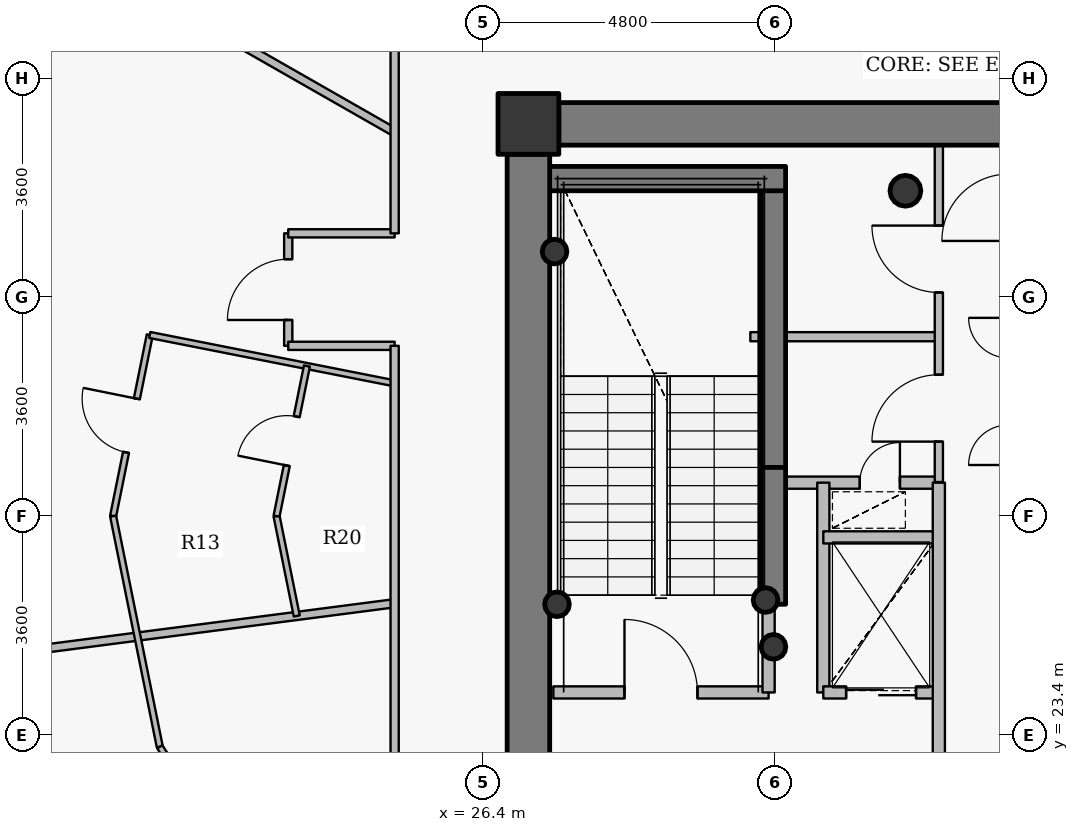
"""IFC4 building model, lengths in metres.
Left out: names, types, materials, properties, quantities, classifications, styles, units other than length and angle.
Written with IfcOpenShell. Run it as: python <this file> out.ifc"""

import sys

from ifc_helpers import new_model, si_unit, direction, frame, frame_2d, origin, origin_2d, place, context, subcontext, project, spatial, rectangle, hollow_circle, extrude, source, transform, mapped, element, fill, save


model = new_model("IFC4")
c1 = context("Model", 3, precision=1e-05, world=origin(), true_north=direction((0.0, 1.0)))
c2 = subcontext(c1, "Body", "Model", "MODEL_VIEW")
j1 = project(units=[si_unit("LENGTHUNIT", "METRE"), si_unit("PLANEANGLEUNIT", "RADIAN")], contexts=[c1])
p1 = place(None, origin())
s1 = spatial("IfcSite", under=j1, at=p1, CompositionType="ELEMENT")
p2 = place(p1, origin())
s2 = spatial("IfcBuilding", under=s1, at=p2, CompositionType="ELEMENT")
p3 = place(p2, frame((0.0, 0.0, 303.0)))
s3 = spatial("IfcBuildingStorey", under=s2, at=p3, CompositionType="ELEMENT", Elevation=303.0)
p4 = place(p3, frame((27.15, 33.45, 0.0), z_axis=(0.0, 0.0, 1.0), x_axis=(1.0, 0.0, 0.0)))
e1 = element("IfcColumn", 1, at=p4, inside=s3, PredefinedType="COLUMN", context=c2, shape_type="SweptSolid", body=[
    extrude(rectangle(XDim=1.0, YDim=1.0, at=origin_2d()), origin(), (0.0, 0.0, 1.0), 3.75),
])
p5 = place(p3, frame((33.35, 32.35, 0.0), z_axis=(0.0, 0.0, 1.0), x_axis=(1.0, 0.0, 0.0)))
e2 = element("IfcColumn", 2, at=p5, inside=s3, PredefinedType="COLUMN", context=c2, shape_type="SweptSolid", body=[
    extrude(hollow_circle(Radius=0.254, WallThickness=0.02, at=origin_2d()), origin(), (0.0, 0.0, 1.0), 3.75),
])
p6 = place(p3, frame((31.18, 27.8, 0.0), z_axis=(0.0, 0.0, 1.0), x_axis=(0.0, 1.0, 0.0)))
e3 = element("IfcWall", 3, at=p6, inside=s3, PredefinedType="SHEAR", context=c2, shape_type="SweptSolid", body=[
    extrude(rectangle(XDim=4.75, YDim=0.4, at=frame_2d((2.375, 0.0))), origin(), (0.0, 0.0, 1.0), 3.75),
])
p7 = place(p3, frame((27.25, 32.55, 0.0), z_axis=(0.0, 0.0, 1.0), x_axis=(1.0, 0.0, 0.0)))
e4 = element("IfcWall", 4, at=p7, inside=s3, PredefinedType="SHEAR", context=c2, shape_type="SweptSolid", body=[
    extrude(rectangle(XDim=4.13, YDim=0.4, at=frame_2d((2.065, 0.0))), origin(), (0.0, 0.0, 1.0), 3.75),
])
for number, where, z_axis, x_axis in (
    (5, (27.58, 31.35, 0.0), (0.0, 0.0, 1.0), (1.0, 0.0, 0.0)),
    (6, (31.05, 25.62, 0.0), (0.0, 0.0, 1.0), (1.0, 0.0, 0.0)),
    (7, (31.18, 24.85, 0.0), (0.0, 0.0, 1.0), (1.0, 0.0, 0.0)),
    (8, (27.62, 25.55, 0.0), (0.0, 0.0, 1.0), (1.0, 0.0, 0.0)),
):
    element("IfcColumn", number, at=place(p3, frame(where, z_axis=z_axis, x_axis=x_axis)), inside=s3, PredefinedType="COLUMN", context=c2, shape_type="SweptSolid", body=[
        extrude(hollow_circle(Radius=0.203, WallThickness=0.016, at=origin_2d()), origin(), (0.0, 0.0, 1.0), 3.75),
    ])
p8 = place(p3, frame((27.65, 33.45, 0.0), z_axis=(0.0, 0.0, 1.0), x_axis=(1.0, 0.0, 0.0)))
e9 = element("IfcWall", 9, at=p8, inside=s3, PredefinedType="SHEAR", context=c2, shape_type="SweptSolid", body=[
    extrude(rectangle(XDim=16.7, YDim=0.7, at=frame_2d((8.35, 0.0))), origin(), (0.0, 0.0, 1.0), 3.05),
])
p9 = place(p8, frame((12.775, 0.0, 0.0)))
e10 = element("IfcOpeningElement", 10, at=p9, cuts=e9, PredefinedType="OPENING", context=c2, shape_type="SweptSolid", body=[
    extrude(rectangle(XDim=1.15, YDim=2.15, at=origin_2d()), frame((0.575, 0.36, 1.075), z_axis=(0.0, -1.0, 0.0), x_axis=(1.0, 0.0, 0.0)), (0.0, 0.0, 1.0), 0.72),
])
p10 = place(p3, frame((27.15, 21.05, 0.0), z_axis=(0.0, 0.0, 1.0), x_axis=(0.0, 1.0, 0.0)))
e11 = element("IfcWall", 11, at=p10, inside=s3, PredefinedType="SHEAR", context=c2, shape_type="SweptSolid", body=[
    extrude(rectangle(XDim=11.9, YDim=0.7, at=frame_2d((5.95, 0.0))), origin(), (0.0, 0.0, 1.0), 3.05),
])
p11 = place(p3, frame((31.18, 25.55, 0.0), z_axis=(0.0, 0.0, 1.0), x_axis=(0.0, 1.0, 0.0)))
e12 = element("IfcWall", 12, at=p11, inside=s3, PredefinedType="SHEAR", context=c2, shape_type="SweptSolid", body=[
    extrude(rectangle(XDim=2.25, YDim=0.4, at=frame_2d((1.125, 0.0))), origin(), (0.0, 0.0, 1.0), 3.1),
])
p12 = place(p3, frame((14.033, 24.151, 0.0), z_axis=(0.0, 0.0, 1.0), x_axis=(0.99169266035, 0.128629963101, 0.0)))
e13 = element("IfcWall", 13, at=p12, inside=s3, PredefinedType="PARTITIONING", context=c2, shape_type="SweptSolid", body=[
    extrude(rectangle(XDim=11.009, YDim=0.135, at=frame_2d((5.504, 0.0))), origin(), (0.0, 0.0, 1.0), 2.985),
])
p13 = place(p3, frame((18.016, 37.274, 0.0), z_axis=(0.0, 0.0, 1.0), x_axis=(0.868277005727, -0.496079672357, 0.0)))
e14 = element("IfcWall", 14, at=p13, inside=s3, PredefinedType="PARTITIONING", context=c2, shape_type="SweptSolid", body=[
    extrude(rectangle(XDim=7.985, YDim=0.135, at=frame_2d((3.993, 0.0))), origin(), (0.0, 0.0, 1.0), 2.985),
])
p14 = place(p3, frame((20.32, 27.0, 0.0), z_axis=(0.0, 0.0, 1.0), x_axis=(0.198201469781, 0.980161301713, 0.0)))
e15 = element("IfcWall", 15, at=p14, inside=s3, PredefinedType="PARTITIONING", context=c2, shape_type="SweptSolid", body=[
    extrude(rectangle(XDim=3.039, YDim=0.1, at=frame_2d((1.52, 0.0))), origin(), (0.0, 0.0, 1.0), 3.035),
])
p15 = place(p14, frame((1.069, 0.0, 0.0)))
e16 = element("IfcOpeningElement", 16, at=p15, cuts=e15, PredefinedType="OPENING", context=c2, shape_type="SweptSolid", body=[
    extrude(rectangle(XDim=0.9, YDim=2.1, at=origin_2d()), frame((0.45, 0.06, 1.05), z_axis=(0.0, -1.0, 0.0), x_axis=(1.0, 0.0, 0.0)), (0.0, 0.0, 1.0), 0.12),
])
p16 = place(p3, frame((20.32, 27.0, 0.0), z_axis=(0.0, 0.0, 1.0), x_axis=(0.198226068862, -0.980156327135, 0.0)))
e17 = element("IfcWall", 17, at=p16, inside=s3, PredefinedType="PARTITIONING", context=c2, shape_type="SweptSolid", body=[
    extrude(rectangle(XDim=3.871, YDim=0.1, at=frame_2d((1.936, 0.0))), origin(), (0.0, 0.0, 1.0), 3.035),
])
p17 = place(p3, frame((20.922, 29.979, 0.0), z_axis=(0.0, 0.0, 1.0), x_axis=(0.981042206934, -0.19379419035, 0.0)))
e18 = element("IfcWall", 18, at=p17, inside=s3, PredefinedType="PARTITIONING", context=c2, shape_type="SweptSolid", body=[
    extrude(rectangle(XDim=4.106, YDim=0.1, at=frame_2d((2.053, 0.0))), origin(), (0.0, 0.0, 1.0), 3.5),
])
p18 = place(p3, frame((21.087, 23.206, 0.0), z_axis=(0.0, 0.0, 1.0), x_axis=(0.545435886628, -0.838152547916, 0.0)))
e19 = element("IfcWall", 19, at=p18, inside=s3, PredefinedType="PARTITIONING", context=c2, shape_type="SweptSolid", body=[
    extrude(rectangle(XDim=4.083, YDim=0.1, at=frame_2d((2.042, 0.0))), origin(), (0.0, 0.0, 1.0), 3.035),
])
p19 = place(p3, frame((23.008, 27.0, 0.0), z_axis=(0.0, 0.0, 1.0), x_axis=(0.198189512146, -0.980163719628, 0.0)))
e20 = element("IfcWall", 20, at=p19, inside=s3, PredefinedType="PARTITIONING", context=c2, shape_type="SweptSolid", body=[
    extrude(rectangle(XDim=1.675, YDim=0.1, at=frame_2d((0.838, 0.0))), origin(), (0.0, 0.0, 1.0), 3.035),
])
p20 = place(p3, frame((23.008, 27.0, 0.0), z_axis=(0.0, 0.0, 1.0), x_axis=(0.19818541272, 0.980164548525, 0.0)))
e21 = element("IfcWall", 21, at=p20, inside=s3, PredefinedType="PARTITIONING", context=c2, shape_type="SweptSolid", body=[
    extrude(rectangle(XDim=2.518, YDim=0.1, at=frame_2d((1.259, 0.0))), origin(), (0.0, 0.0, 1.0), 3.035),
])
p21 = place(p20, frame((0.849, 0.0, 0.0)))
e22 = element("IfcOpeningElement", 22, at=p21, cuts=e21, PredefinedType="OPENING", context=c2, shape_type="SweptSolid", body=[
    extrude(rectangle(XDim=0.82, YDim=2.1, at=origin_2d()), frame((0.41, 0.06, 1.05), z_axis=(0.0, -1.0, 0.0), x_axis=(1.0, 0.0, 0.0)), (0.0, 0.0, 1.0), 0.12),
])
p22 = place(p3, frame((23.2, 29.8, 0.0), z_axis=(0.0, 0.0, 1.0), x_axis=(0.0, 1.0, 0.0)))
e23 = element("IfcWall", 23, at=p22, inside=s3, PredefinedType="PARTITIONING", context=c2, shape_type="SweptSolid", body=[
    extrude(rectangle(XDim=1.85, YDim=0.135, at=frame_2d((0.925, 0.0))), origin(), (0.0, 0.0, 1.0), 3.5),
])
p23 = place(p22, frame((0.425, 0.0, 0.0)))
e24 = element("IfcOpeningElement", 24, at=p23, cuts=e23, PredefinedType="OPENING", context=c2, shape_type="SweptSolid", body=[
    extrude(rectangle(XDim=1.0, YDim=2.15, at=origin_2d()), frame((0.5, 0.078, 1.075), z_axis=(0.0, -1.0, 0.0), x_axis=(1.0, 0.0, 0.0)), (0.0, 0.0, 1.0), 0.155),
])
p24 = place(p3, frame((23.2, 29.8, 0.0), z_axis=(0.0, 0.0, 1.0), x_axis=(1.0, 0.0, 0.0)))
e25 = element("IfcWall", 25, at=p24, inside=s3, PredefinedType="PARTITIONING", context=c2, shape_type="SweptSolid", body=[
    extrude(rectangle(XDim=1.75, YDim=0.135, at=frame_2d((0.875, 0.0))), origin(), (0.0, 0.0, 1.0), 3.5),
])
p25 = place(p3, frame((23.2, 31.65, 0.0), z_axis=(0.0, 0.0, 1.0), x_axis=(1.0, 0.0, 0.0)))
e26 = element("IfcWall", 26, at=p25, inside=s3, PredefinedType="PARTITIONING", context=c2, shape_type="SweptSolid", body=[
    extrude(rectangle(XDim=1.75, YDim=0.135, at=frame_2d((0.875, 0.0))), origin(), (0.0, 0.0, 1.0), 3.035),
])
p26 = place(p3, frame((24.95, 18.35, 0.0), z_axis=(0.0, 0.0, 1.0), x_axis=(0.0, 1.0, 0.0)))
e27 = element("IfcWall", 27, at=p26, inside=s3, PredefinedType="PARTITIONING", context=c2, shape_type="SweptSolid", body=[
    extrude(rectangle(XDim=11.45, YDim=0.135, at=frame_2d((5.725, 0.0))), origin(), (0.0, 0.0, 1.0), 3.035),
])
p27 = place(p26, frame((3.128, 0.0, 0.0)))
e28 = element("IfcOpeningElement", 28, at=p27, cuts=e27, PredefinedType="OPENING", context=c2, shape_type="SweptSolid", body=[
    extrude(rectangle(XDim=1.0, YDim=2.15, at=origin_2d()), frame((0.5, 0.078, 1.075), z_axis=(0.0, -1.0, 0.0), x_axis=(1.0, 0.0, 0.0)), (0.0, 0.0, 1.0), 0.155),
])
p28 = place(p3, frame((24.95, 31.65, 0.0), z_axis=(0.0, 0.0, 1.0), x_axis=(0.0, 1.0, 0.0)))
e29 = element("IfcWall", 29, at=p28, inside=s3, PredefinedType="PARTITIONING", context=c2, shape_type="SweptSolid", body=[
    extrude(rectangle(XDim=4.0, YDim=0.135, at=frame_2d((2.0, 0.0))), origin(), (0.0, 0.0, 1.0), 3.035),
])
p29 = place(p3, frame((27.56, 24.1, 0.0), z_axis=(0.0, 0.0, 1.0), x_axis=(1.0, 0.0, 0.0)))
e30 = element("IfcWall", 30, at=p29, inside=s3, PredefinedType="PARTITIONING", context=c2, shape_type="SweptSolid", body=[
    extrude(rectangle(XDim=3.54, YDim=0.2, at=frame_2d((1.77, 0.0))), origin(), (0.0, 0.0, 1.0), 3.5),
])
p30 = place(p29, frame((1.17, 0.0, 0.0)))
e31 = element("IfcOpeningElement", 31, at=p30, cuts=e30, PredefinedType="OPENING", context=c2, shape_type="SweptSolid", body=[
    extrude(rectangle(XDim=1.2, YDim=2.15, at=origin_2d()), frame((0.6, 0.11, 1.075), z_axis=(0.0, -1.0, 0.0), x_axis=(1.0, 0.0, 0.0)), (0.0, 0.0, 1.0), 0.22),
])
p31 = place(p3, frame((30.8, 29.95, 0.0), z_axis=(0.0, 0.0, 1.0), x_axis=(1.0, 0.0, 0.0)))
e32 = element("IfcWall", 32, at=p31, inside=s3, PredefinedType="PARTITIONING", context=c2, shape_type="SweptSolid", body=[
    extrude(rectangle(XDim=3.1, YDim=0.15, at=frame_2d((1.55, 0.0))), origin(), (0.0, 0.0, 1.0), 3.085),
])
p32 = place(p3, frame((31.1, 24.1, 0.0), z_axis=(0.0, 0.0, 1.0), x_axis=(0.0, 1.0, 0.0)))
e33 = element("IfcWall", 33, at=p32, inside=s3, PredefinedType="PARTITIONING", context=c2, shape_type="SweptSolid", body=[
    extrude(rectangle(XDim=1.44, YDim=0.2, at=frame_2d((0.72, 0.0))), origin(), (0.0, 0.0, 1.0), 3.5),
])
p33 = place(p3, frame((31.1, 27.55, 0.0), z_axis=(0.0, 0.0, 1.0), x_axis=(1.0, 0.0, 0.0)))
e34 = element("IfcWall", 34, at=p33, inside=s3, PredefinedType="PARTITIONING", context=c2, shape_type="SweptSolid", body=[
    extrude(rectangle(XDim=2.8, YDim=0.2, at=frame_2d((1.4, 0.0))), origin(), (0.0, 0.0, 1.0), 3.085),
])
p34 = place(p33, frame((1.5, 0.0, 0.0)))
e35 = element("IfcOpeningElement", 35, at=p34, cuts=e34, PredefinedType="OPENING", context=c2, shape_type="SweptSolid", body=[
    extrude(rectangle(XDim=0.66, YDim=2.05, at=origin_2d()), frame((0.33, 0.11, 1.025), z_axis=(0.0, -1.0, 0.0), x_axis=(1.0, 0.0, 0.0)), (0.0, 0.0, 1.0), 0.22),
])
p35 = place(p3, frame((32.0, 24.1, 0.0), z_axis=(0.0, 0.0, 1.0), x_axis=(0.0, 1.0, 0.0)))
e36 = element("IfcWall", 36, at=p35, inside=s3, PredefinedType="PARTITIONING", context=c2, shape_type="SweptSolid", body=[
    extrude(rectangle(XDim=3.45, YDim=0.2, at=frame_2d((1.725, 0.0))), origin(), (0.0, 0.0, 1.0), 3.5),
])
p36 = place(p3, frame((32.0, 24.1, 0.0), z_axis=(0.0, 0.0, 1.0), x_axis=(1.0, 0.0, 0.0)))
e37 = element("IfcWall", 37, at=p36, inside=s3, PredefinedType="PARTITIONING", context=c2, shape_type="SweptSolid", body=[
    extrude(rectangle(XDim=1.9, YDim=0.2, at=frame_2d((0.95, 0.0))), origin(), (0.0, 0.0, 1.0), 3.085),
])
p37 = place(p36, frame((0.375, 0.0, 0.0)))
e38 = element("IfcOpeningElement", 38, at=p37, cuts=e37, PredefinedType="OPENING", context=c2, shape_type="SweptSolid", body=[
    extrude(rectangle(XDim=1.15, YDim=2.15, at=origin_2d()), frame((0.575, 0.11, 1.075), z_axis=(0.0, -1.0, 0.0), x_axis=(1.0, 0.0, 0.0)), (0.0, 0.0, 1.0), 0.22),
])
p38 = place(p3, frame((32.0, 26.65, 0.0), z_axis=(0.0, 0.0, 1.0), x_axis=(1.0, 0.0, 0.0)))
e39 = element("IfcWall", 39, at=p38, inside=s3, PredefinedType="PARTITIONING", context=c2, shape_type="SweptSolid", body=[
    extrude(rectangle(XDim=1.9, YDim=0.2, at=frame_2d((0.95, 0.0))), origin(), (0.0, 0.0, 1.0), 3.085),
])
p39 = place(p3, frame((33.9, 20.9, 0.0), z_axis=(0.0, 0.0, 1.0), x_axis=(0.0, 1.0, 0.0)))
e40 = element("IfcWall", 40, at=p39, inside=s3, PredefinedType="PARTITIONING", context=c2, shape_type="SweptSolid", body=[
    extrude(rectangle(XDim=6.65, YDim=0.2, at=frame_2d((3.325, 0.0))), origin(), (0.0, 0.0, 1.0), 3.085),
])
p40 = place(p3, frame((33.9, 27.56, 0.0), z_axis=(0.0, 0.0, 1.0), x_axis=(0.0, 1.0, 0.0)))
e41 = element("IfcWall", 41, at=p40, inside=s3, PredefinedType="PARTITIONING", context=c2, shape_type="SweptSolid", body=[
    extrude(rectangle(XDim=5.54, YDim=0.135, at=frame_2d((2.77, 0.0))), origin(), (0.0, 0.0, 1.0), 3.085),
])
p41 = place(p40, frame((0.665, 0.0, 0.0)))
e42 = element("IfcOpeningElement", 42, at=p41, cuts=e41, PredefinedType="OPENING", context=c2, shape_type="SweptSolid", body=[
    extrude(rectangle(XDim=1.1, YDim=2.15, at=origin_2d()), frame((0.55, 0.078, 1.075), z_axis=(0.0, -1.0, 0.0), x_axis=(1.0, 0.0, 0.0)), (0.0, 0.0, 1.0), 0.155),
])
p42 = place(p40, frame((3.117, 0.0, 0.0)))
e43 = element("IfcOpeningElement", 43, at=p42, cuts=e41, PredefinedType="OPENING", context=c2, shape_type="SweptSolid", body=[
    extrude(rectangle(XDim=1.1, YDim=2.15, at=origin_2d()), frame((0.55, 0.078, 1.075), z_axis=(0.0, -1.0, 0.0), x_axis=(1.0, 0.0, 0.0)), (0.0, 0.0, 1.0), 0.155),
])
p43 = place(p3, frame((27.64, 33.8, 0.0), z_axis=(0.0, 0.0, 1.0), x_axis=(-1.0, 0.0, 0.0)))
e44 = element("IfcWall", 44, at=p43, inside=s3, PredefinedType="PARTITIONING", context=c2, shape_type="SweptSolid", body=[
    extrude(rectangle(XDim=0.84, YDim=0.135, at=frame_2d((0.42, 0.0))), origin(), (0.0, 0.0, 1.0), 3.035),
])
p44 = place(p3, frame((26.8, 33.492, 0.0), z_axis=(0.0, 0.0, 1.0), x_axis=(0.0, -1.0, 0.0)))
e45 = element("IfcWall", 45, at=p44, inside=s3, PredefinedType="PARTITIONING", context=c2, shape_type="SweptSolid", body=[
    extrude(rectangle(XDim=0.532, YDim=0.135, at=frame_2d((0.266, 0.0))), origin(), (0.0, 0.0, 1.0), 3.5),
])
m1 = source(origin(), c2, "Body", "SweptSolid", [
    extrude(rectangle(XDim=1.2, YDim=2.15, at=origin_2d()), frame((0.6, 0.025, 1.075), z_axis=(0.0, -1.0, 0.0), x_axis=(1.0, 0.0, 0.0)), (0.0, 0.0, 1.0), 0.05),
])
p45 = place(p30, origin())
e46 = element("IfcDoor", 46, at=p45, inside=s3, OperationType="SINGLE_SWING_LEFT", PredefinedType="DOOR", context=c2, shape_type="MappedRepresentation", body=[
    mapped(m1, transform((0.0, 0.0, 0.0), x_axis=(1.0, 0.0, 0.0), y_axis=(0.0, 1.0, 0.0), z_axis=(0.0, 0.0, 1.0), scale=1.0)),
])
fill(e31, e46)
m2 = source(origin(), c2, "Body", "SweptSolid", [
    extrude(rectangle(XDim=1.15, YDim=2.15, at=origin_2d()), frame((0.575, 0.025, 1.075), z_axis=(0.0, -1.0, 0.0), x_axis=(1.0, 0.0, 0.0)), (0.0, 0.0, 1.0), 0.05),
])
p46 = place(p37, origin())
e47 = element("IfcDoor", 47, at=p46, inside=s3, OperationType="DOUBLE_DOOR_SLIDING", PredefinedType="USERDEFINED", context=c2, shape_type="MappedRepresentation", body=[
    mapped(m2, transform((0.0, 0.0, 0.0), x_axis=(1.0, 0.0, 0.0), y_axis=(0.0, 1.0, 0.0), z_axis=(0.0, 0.0, 1.0), scale=1.0)),
])
fill(e38, e47)
m3 = source(origin(), c2, "Body", "SweptSolid", [
    extrude(rectangle(XDim=1.0, YDim=2.15, at=origin_2d()), frame((0.5, 0.025, 1.075), z_axis=(0.0, -1.0, 0.0), x_axis=(1.0, 0.0, 0.0)), (0.0, 0.0, 1.0), 0.05),
])
p47 = place(p23, origin())
e48 = element("IfcDoor", 48, at=p47, inside=s3, OperationType="SINGLE_SWING_LEFT", PredefinedType="DOOR", context=c2, shape_type="MappedRepresentation", body=[
    mapped(m3, transform((0.0, 0.0, 0.0), x_axis=(1.0, 0.0, 0.0), y_axis=(0.0, 1.0, 0.0), z_axis=(0.0, 0.0, 1.0), scale=1.0)),
])
fill(e24, e48)
m4 = source(origin(), c2, "Body", "SweptSolid", [
    extrude(rectangle(XDim=0.9, YDim=2.1, at=origin_2d()), frame((0.45, 0.025, 1.05), z_axis=(0.0, -1.0, 0.0), x_axis=(1.0, 0.0, 0.0)), (0.0, 0.0, 1.0), 0.05),
])
p48 = place(p15, origin())
e49 = element("IfcDoor", 49, at=p48, inside=s3, OperationType="SINGLE_SWING_RIGHT", PredefinedType="DOOR", context=c2, shape_type="MappedRepresentation", body=[
    mapped(m4, transform((0.0, 0.0, 0.0), x_axis=(1.0, 0.0, 0.0), y_axis=(0.0, 1.0, 0.0), z_axis=(0.0, 0.0, 1.0), scale=1.0)),
])
fill(e16, e49)
m5 = source(origin(), c2, "Body", "SweptSolid", [
    extrude(rectangle(XDim=0.82, YDim=2.1, at=origin_2d()), frame((0.41, 0.025, 1.05), z_axis=(0.0, -1.0, 0.0), x_axis=(1.0, 0.0, 0.0)), (0.0, 0.0, 1.0), 0.05),
])
p49 = place(p21, origin())
e50 = element("IfcDoor", 50, at=p49, inside=s3, OperationType="SINGLE_SWING_LEFT", PredefinedType="DOOR", context=c2, shape_type="MappedRepresentation", body=[
    mapped(m5, transform((0.0, 0.0, 0.0), x_axis=(1.0, 0.0, 0.0), y_axis=(0.0, 1.0, 0.0), z_axis=(0.0, 0.0, 1.0), scale=1.0)),
])
fill(e22, e50)
m6 = source(origin(), c2, "Body", "SweptSolid", [
    extrude(rectangle(XDim=1.1, YDim=2.15, at=origin_2d()), frame((0.55, 0.025, 1.075), z_axis=(0.0, -1.0, 0.0), x_axis=(1.0, 0.0, 0.0)), (0.0, 0.0, 1.0), 0.05),
])
p50 = place(p41, origin())
e51 = element("IfcDoor", 51, at=p50, inside=s3, OperationType="SINGLE_SWING_LEFT", PredefinedType="DOOR", context=c2, shape_type="MappedRepresentation", body=[
    mapped(m6, transform((0.0, 0.0, 0.0), x_axis=(1.0, 0.0, 0.0), y_axis=(0.0, 1.0, 0.0), z_axis=(0.0, 0.0, 1.0), scale=1.0)),
])
fill(e42, e51)
p51 = place(p42, origin())
e52 = element("IfcDoor", 52, at=p51, inside=s3, OperationType="SINGLE_SWING_RIGHT", PredefinedType="DOOR", context=c2, shape_type="MappedRepresentation", body=[
    mapped(m6, transform((0.0, 0.0, 0.0), x_axis=(1.0, 0.0, 0.0), y_axis=(0.0, 1.0, 0.0), z_axis=(0.0, 0.0, 1.0), scale=1.0)),
])
fill(e43, e52)
m7 = source(origin(), c2, "Body", "SweptSolid", [
    extrude(rectangle(XDim=0.66, YDim=2.05, at=origin_2d()), frame((0.33, 0.025, 1.025), z_axis=(0.0, -1.0, 0.0), x_axis=(1.0, 0.0, 0.0)), (0.0, 0.0, 1.0), 0.05),
])
p52 = place(p34, origin())
e53 = element("IfcDoor", 53, at=p52, inside=s3, OperationType="SINGLE_SWING_RIGHT", PredefinedType="USERDEFINED", context=c2, shape_type="MappedRepresentation", body=[
    mapped(m7, transform((0.0, 0.0, 0.0), x_axis=(1.0, 0.0, 0.0), y_axis=(0.0, 1.0, 0.0), z_axis=(0.0, 0.0, 1.0), scale=1.0)),
])
fill(e35, e53)
save(model, sys.argv[1])
